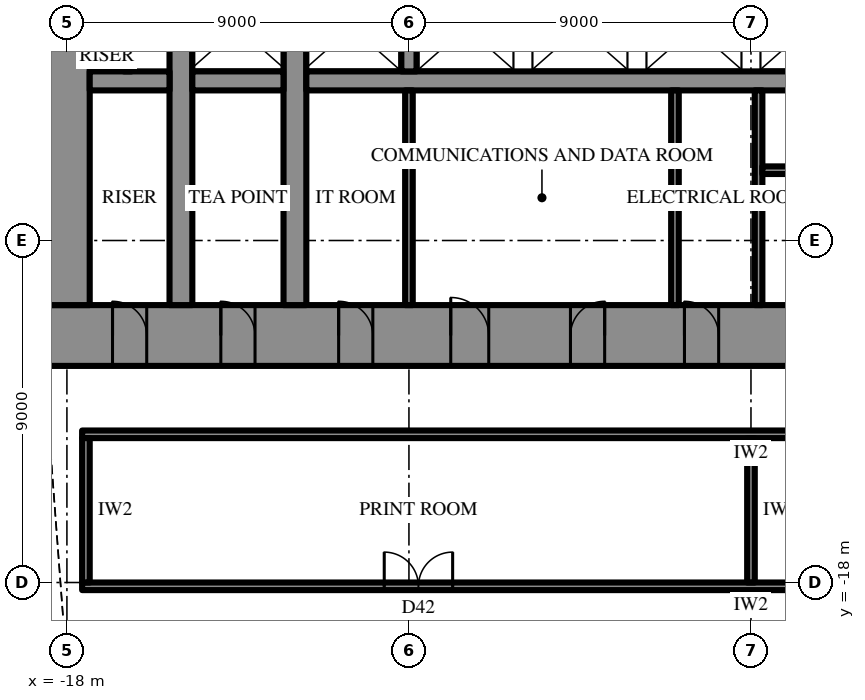
"""IFC4 building model, lengths in metres.
Left out: names, types, materials, properties, quantities, classifications, styles, units other than length and angle.
Written with IfcOpenShell. Run it as: python <this file> out.ifc"""

import sys

from ifc_helpers import new_model, si_unit, direction, frame, frame_2d, origin, place, context, subcontext, project, spatial, rectangle, extrude, element, fill, save


model = new_model("IFC4")
c1 = context("Model", 3, precision=1e-05, world=origin(), true_north=direction((0.0, 1.0)))
c2 = subcontext(c1, "Body", "Model", "MODEL_VIEW")
j1 = project(units=[si_unit("LENGTHUNIT", "METRE"), si_unit("PLANEANGLEUNIT", "RADIAN")], contexts=[c1])
p1 = place(None, origin())
s1 = spatial("IfcSite", under=j1, at=p1, CompositionType="ELEMENT")
p2 = place(p1, origin())
s2 = spatial("IfcBuilding", under=s1, at=p2, CompositionType="ELEMENT")
p3 = place(p2, frame((0.0, 0.0, 195.1)))
s3 = spatial("IfcBuildingStorey", under=s2, at=p3, CompositionType="ELEMENT", Elevation=195.1)
p4 = place(p3, frame((18.6, -11.5, 0.0), z_axis=(0.0, 0.0, 1.0), x_axis=(-1.0, 0.0, 0.0)))
e1 = element("IfcWall", 1, at=p4, inside=s3, PredefinedType="SHEAR", context=c2, shape_type="SweptSolid", body=[
    extrude(rectangle(XDim=37.2, YDim=1.6, at=frame_2d((18.6, 0.0))), origin(), (0.0, 0.0, 1.0), 4.2),
])
p5 = place(p4, frame((19.45, 0.0, 0.0)))
e2 = element("IfcOpeningElement", 2, at=p5, cuts=e1, PredefinedType="OPENING", context=c2, shape_type="SweptSolid", body=[
    extrude(rectangle(XDim=0.9, YDim=2.2, at=frame_2d((0.45, 1.1))), frame((0.0, 0.81, 0.0), z_axis=(0.0, -1.0, 0.0), x_axis=(1.0, 0.0, 0.0)), (0.0, 0.0, 1.0), 1.62),
])
p6 = place(p4, frame((22.45, 0.0, 0.0)))
e3 = element("IfcOpeningElement", 3, at=p6, cuts=e1, PredefinedType="OPENING", context=c2, shape_type="SweptSolid", body=[
    extrude(rectangle(XDim=0.9, YDim=2.2, at=frame_2d((0.45, 1.1))), frame((0.0, 0.81, 0.0), z_axis=(0.0, -1.0, 0.0), x_axis=(1.0, 0.0, 0.0)), (0.0, 0.0, 1.0), 1.62),
])
p7 = place(p4, frame((25.5, 0.0, 0.0)))
e4 = element("IfcOpeningElement", 4, at=p7, cuts=e1, PredefinedType="OPENING", context=c2, shape_type="SweptSolid", body=[
    extrude(rectangle(XDim=1.0, YDim=2.2, at=frame_2d((0.5, 1.1))), frame((0.0, 0.81, 0.0), z_axis=(0.0, -1.0, 0.0), x_axis=(1.0, 0.0, 0.0)), (0.0, 0.0, 1.0), 1.62),
])
p8 = place(p4, frame((1.8, 0.0, 0.0)))
e5 = element("IfcOpeningElement", 5, at=p8, cuts=e1, PredefinedType="OPENING", context=c2, shape_type="SweptSolid", body=[
    extrude(rectangle(XDim=0.9, YDim=2.2, at=frame_2d((0.45, 1.1))), frame((0.0, 0.81, 0.0), z_axis=(0.0, -1.0, 0.0), x_axis=(1.0, 0.0, 0.0)), (0.0, 0.0, 1.0), 1.62),
])
p9 = place(p4, frame((4.65, 0.0, 0.0)))
e6 = element("IfcOpeningElement", 6, at=p9, cuts=e1, PredefinedType="OPENING", context=c2, shape_type="SweptSolid", body=[
    extrude(rectangle(XDim=0.9, YDim=2.2, at=frame_2d((0.45, 1.1))), frame((0.0, 0.81, 0.0), z_axis=(0.0, -1.0, 0.0), x_axis=(1.0, 0.0, 0.0)), (0.0, 0.0, 1.0), 1.62),
])
p10 = place(p4, frame((7.75, 0.0, 0.0)))
e7 = element("IfcOpeningElement", 7, at=p10, cuts=e1, PredefinedType="OPENING", context=c2, shape_type="SweptSolid", body=[
    extrude(rectangle(XDim=0.9, YDim=2.2, at=frame_2d((0.45, 1.1))), frame((0.0, 0.81, 0.0), z_axis=(0.0, -1.0, 0.0), x_axis=(1.0, 0.0, 0.0)), (0.0, 0.0, 1.0), 1.62),
])
p11 = place(p4, frame((28.55, 0.0, 0.0)))
e8 = element("IfcOpeningElement", 8, at=p11, cuts=e1, PredefinedType="OPENING", context=c2, shape_type="SweptSolid", body=[
    extrude(rectangle(XDim=0.9, YDim=2.2, at=frame_2d((0.45, 1.1))), frame((0.0, 0.81, 0.0), z_axis=(0.0, -1.0, 0.0), x_axis=(1.0, 0.0, 0.0)), (0.0, 0.0, 1.0), 1.62),
])
p12 = place(p4, frame((31.65, 0.0, 0.0)))
e9 = element("IfcOpeningElement", 9, at=p12, cuts=e1, PredefinedType="OPENING", context=c2, shape_type="SweptSolid", body=[
    extrude(rectangle(XDim=0.9, YDim=2.2, at=frame_2d((0.45, 1.1))), frame((0.0, 0.81, 0.0), z_axis=(0.0, -1.0, 0.0), x_axis=(1.0, 0.0, 0.0)), (0.0, 0.0, 1.0), 1.62),
])
p13 = place(p4, frame((34.5, 0.0, 0.0)))
e10 = element("IfcOpeningElement", 10, at=p13, cuts=e1, PredefinedType="OPENING", context=c2, shape_type="SweptSolid", body=[
    extrude(rectangle(XDim=0.9, YDim=2.2, at=frame_2d((0.45, 1.1))), frame((0.0, 0.81, 0.0), z_axis=(0.0, -1.0, 0.0), x_axis=(1.0, 0.0, 0.0)), (0.0, 0.0, 1.0), 1.62),
])
p14 = place(p3, frame((-18.0, 10.7, 0.0), z_axis=(0.0, 0.0, 1.0), x_axis=(0.0, -1.0, 0.0)))
e11 = element("IfcWall", 11, at=p14, inside=s3, PredefinedType="SHEAR", context=c2, shape_type="SweptSolid", body=[
    extrude(rectangle(XDim=21.4, YDim=1.2, at=frame_2d((10.7, 0.0))), origin(), (0.0, 0.0, 1.0), 4.2),
])
p15 = place(p14, frame((9.8, 0.0, 0.0)))
e12 = element("IfcOpeningElement", 12, at=p15, cuts=e11, PredefinedType="OPENING", context=c2, shape_type="SweptSolid", body=[
    extrude(rectangle(XDim=1.8, YDim=2.4, at=frame_2d((0.9, 1.2))), frame((0.0, 0.61, 0.0), z_axis=(0.0, -1.0, 0.0), x_axis=(1.0, 0.0, 0.0)), (0.0, 0.0, 1.0), 1.22),
])
p16 = place(p3, frame((-12.0, -10.7, 0.0), z_axis=(0.0, 0.0, 1.0), x_axis=(0.0, 1.0, 0.0)))
e13 = element("IfcWall", 13, at=p16, inside=s3, PredefinedType="SHEAR", context=c2, shape_type="SweptSolid", body=[
    extrude(rectangle(XDim=21.4, YDim=0.6, at=frame_2d((10.7, 0.0))), origin(), (0.0, 0.0, 1.0), 4.2),
])
p17 = place(p16, frame((9.8, 0.0, 0.0)))
e14 = element("IfcOpeningElement", 14, at=p17, cuts=e13, PredefinedType="OPENING", context=c2, shape_type="SweptSolid", body=[
    extrude(rectangle(XDim=1.8, YDim=2.4, at=frame_2d((0.9, 1.2))), frame((0.0, 0.31, 0.0), z_axis=(0.0, -1.0, 0.0), x_axis=(1.0, 0.0, 0.0)), (0.0, 0.0, 1.0), 0.62),
])
p18 = place(p3, frame((-15.0, -10.7, 0.0), z_axis=(0.0, 0.0, 1.0), x_axis=(0.0, 1.0, 0.0)))
e15 = element("IfcWall", 15, at=p18, inside=s3, PredefinedType="SHEAR", context=c2, shape_type="SweptSolid", body=[
    extrude(rectangle(XDim=21.4, YDim=0.6, at=frame_2d((10.7, 0.0))), origin(), (0.0, 0.0, 1.0), 4.2),
])
p19 = place(p18, frame((9.8, 0.0, 0.0)))
e16 = element("IfcOpeningElement", 16, at=p19, cuts=e15, PredefinedType="OPENING", context=c2, shape_type="SweptSolid", body=[
    extrude(rectangle(XDim=1.8, YDim=2.4, at=frame_2d((0.9, 1.2))), frame((0.0, 0.31, 0.0), z_axis=(0.0, -1.0, 0.0), x_axis=(1.0, 0.0, 0.0)), (0.0, 0.0, 1.0), 0.62),
])
p20 = place(p3, frame((11.7, -4.8, 0.0), z_axis=(0.0, 0.0, 1.0), x_axis=(-1.0, 0.0, 0.0)))
e17 = element("IfcWall", 17, at=p20, inside=s3, PredefinedType="SHEAR", context=c2, shape_type="SweptSolid", body=[
    extrude(rectangle(XDim=23.4, YDim=0.5, at=frame_2d((11.7, 0.0))), origin(), (0.0, 0.0, 1.0), 4.2),
])
p21 = place(p20, frame((6.6, 0.0, 0.0)))
e18 = element("IfcOpeningElement", 18, at=p21, cuts=e17, PredefinedType="OPENING", context=c2, shape_type="SweptSolid", body=[
    extrude(rectangle(XDim=1.2, YDim=2.2, at=frame_2d((0.6, 1.1))), frame((0.0, 0.26, 0.0), z_axis=(0.0, -1.0, 0.0), x_axis=(1.0, 0.0, 0.0)), (0.0, 0.0, 1.0), 0.52),
])
p22 = place(p20, frame((3.6, 0.0, 0.0)))
e19 = element("IfcOpeningElement", 19, at=p22, cuts=e17, PredefinedType="OPENING", context=c2, shape_type="SweptSolid", body=[
    extrude(rectangle(XDim=1.2, YDim=2.2, at=frame_2d((0.6, 1.1))), frame((0.0, 0.26, 0.0), z_axis=(0.0, -1.0, 0.0), x_axis=(1.0, 0.0, 0.0)), (0.0, 0.0, 1.0), 0.52),
])
p23 = place(p3, frame((-12.3, -4.8, 0.0), z_axis=(0.0, 0.0, 1.0), x_axis=(-1.0, 0.0, 0.0)))
e20 = element("IfcWall", 20, at=p23, inside=s3, PredefinedType="SHEAR", context=c2, shape_type="SweptSolid", body=[
    extrude(rectangle(XDim=2.4, YDim=0.5, at=frame_2d((1.2, 0.0))), origin(), (0.0, 0.0, 1.0), 4.2),
])
p24 = place(p3, frame((-15.3, -4.8, 0.0), z_axis=(0.0, 0.0, 1.0), x_axis=(-1.0, 0.0, 0.0)))
e21 = element("IfcWall", 21, at=p24, inside=s3, PredefinedType="SHEAR", context=c2, shape_type="SweptSolid", body=[
    extrude(rectangle(XDim=2.1, YDim=0.5, at=frame_2d((1.05, 0.0))), origin(), (0.0, 0.0, 1.0), 4.2),
])
p25 = place(p3, frame((-9.0, -2.25, 0.0), z_axis=(0.0, 0.0, 1.0), x_axis=(0.0, -1.0, 0.0)))
e22 = element("IfcWall", 22, at=p25, inside=s3, PredefinedType="SHEAR", context=c2, shape_type="SweptSolid", body=[
    extrude(rectangle(XDim=2.3, YDim=0.4, at=frame_2d((1.15, 0.0))), origin(), (0.0, 0.0, 1.0), 4.2),
])
p26 = place(p3, frame((0.2, -5.05, 0.0), z_axis=(0.0, 0.0, 1.0), x_axis=(0.0, -1.0, 0.0)))
e23 = element("IfcWall", 23, at=p26, inside=s3, PredefinedType="SHEAR", context=c2, shape_type="SweptSolid", body=[
    extrude(rectangle(XDim=5.65, YDim=0.2, at=frame_2d((2.825, 0.0))), origin(), (0.0, 0.0, 1.0), 4.2),
])
p27 = place(p3, frame((8.9, -7.15, 0.0), z_axis=(0.0, 0.0, 1.0), x_axis=(-1.0, 0.0, 0.0)))
e24 = element("IfcWall", 24, at=p27, inside=s3, PredefinedType="SHEAR", context=c2, shape_type="SweptSolid", body=[
    extrude(rectangle(XDim=8.6, YDim=0.2, at=frame_2d((4.3, 0.0))), origin(), (0.0, 0.0, 1.0), 4.2),
])
p28 = place(p27, frame((0.3, 0.0, 0.0)))
e25 = element("IfcOpeningElement", 25, at=p28, cuts=e24, PredefinedType="OPENING", context=c2, shape_type="SweptSolid", body=[
    extrude(rectangle(XDim=1.0, YDim=2.2, at=frame_2d((0.5, 1.1))), frame((0.0, 0.11, 0.0), z_axis=(0.0, -1.0, 0.0), x_axis=(1.0, 0.0, 0.0)), (0.0, 0.0, 1.0), 0.22),
])
for number, where, z_axis, x_axis in (
    (26, (-9.0, -5.05, 0.0), (0.0, 0.0, 1.0), (0.0, -1.0, 0.0)),
    (27, (-2.0, -5.05, 0.0), (0.0, 0.0, 1.0), (0.0, -1.0, 0.0)),
):
    element("IfcWall", number, at=place(p3, frame(where, z_axis=z_axis, x_axis=x_axis)), inside=s3, PredefinedType="PARTITIONING", context=c2, shape_type="SweptSolid", body=[
        extrude(rectangle(XDim=5.65, YDim=0.2, at=frame_2d((2.825, 0.0))), origin(), (0.0, 0.0, 1.0), 4.0),
    ])
p29 = place(p3, frame((-16.4, -3.55, 0.0), z_axis=(0.0, 0.0, 1.0), x_axis=(0.0, -1.0, 0.0)))
e28 = element("IfcWall", 28, at=p29, inside=s3, PredefinedType="PARTITIONING", context=c2, shape_type="SweptSolid", body=[
    extrude(rectangle(XDim=1.0, YDim=0.2, at=frame_2d((0.5, 0.0))), origin(), (0.0, 0.0, 1.0), 4.0),
])
p30 = place(p3, frame((17.6, -14.1, 0.0), z_axis=(0.0, 0.0, 1.0), x_axis=(-1.0, 0.0, 0.0)))
e29 = element("IfcWall", 29, at=p30, inside=s3, PredefinedType="PARTITIONING", context=c2, shape_type="SweptSolid", body=[
    extrude(rectangle(XDim=35.2, YDim=0.2, at=frame_2d((17.6, 0.0))), origin(), (0.0, 0.0, 1.0), 4.0),
])
p31 = place(p3, frame((17.6, -18.1, 0.0), z_axis=(0.0, 0.0, 1.0), x_axis=(-1.0, 0.0, 0.0)))
e30 = element("IfcWall", 30, at=p31, inside=s3, PredefinedType="PARTITIONING", context=c2, shape_type="SweptSolid", body=[
    extrude(rectangle(XDim=35.2, YDim=0.2, at=frame_2d((17.6, 0.0))), origin(), (0.0, 0.0, 1.0), 4.0),
])
p32 = place(p31, frame((7.95, 0.0, 0.0)))
e31 = element("IfcOpeningElement", 31, at=p32, cuts=e30, PredefinedType="OPENING", context=c2, shape_type="SweptSolid", body=[
    extrude(rectangle(XDim=1.8, YDim=2.4, at=frame_2d((0.9, 1.2))), frame((0.0, 0.11, 0.0), z_axis=(0.0, -1.0, 0.0), x_axis=(1.0, 0.0, 0.0)), (0.0, 0.0, 1.0), 0.22),
])
p33 = place(p31, frame((25.45, 0.0, 0.0)))
e32 = element("IfcOpeningElement", 32, at=p33, cuts=e30, PredefinedType="OPENING", context=c2, shape_type="SweptSolid", body=[
    extrude(rectangle(XDim=1.8, YDim=2.4, at=frame_2d((0.9, 1.2))), frame((0.0, 0.11, 0.0), z_axis=(0.0, -1.0, 0.0), x_axis=(1.0, 0.0, 0.0)), (0.0, 0.0, 1.0), 0.22),
])
p34 = place(p3, frame((0.0, -14.2, 0.0), z_axis=(0.0, 0.0, 1.0), x_axis=(0.0, -1.0, 0.0)))
e33 = element("IfcWall", 33, at=p34, inside=s3, PredefinedType="PARTITIONING", context=c2, shape_type="SweptSolid", body=[
    extrude(rectangle(XDim=3.8, YDim=0.2, at=frame_2d((1.9, 0.0))), origin(), (0.0, 0.0, 1.0), 2.992),
])
p35 = place(p3, frame((-17.5, -14.2, 0.0), z_axis=(0.0, 0.0, 1.0), x_axis=(0.0, -1.0, 0.0)))
e34 = element("IfcWall", 34, at=p35, inside=s3, PredefinedType="PARTITIONING", context=c2, shape_type="SweptSolid", body=[
    extrude(rectangle(XDim=3.8, YDim=0.2, at=frame_2d((1.9, 0.0))), origin(), (0.0, 0.0, 1.0), 4.0),
])
p36 = place(p5, frame((0.9, 0.0, 0.0), z_axis=(0.0, 0.0, 1.0), x_axis=(-1.0, 0.0, 0.0)))
e35 = element("IfcDoor", 35, at=p36, inside=s3, OperationType="SINGLE_SWING_RIGHT", PredefinedType="DOOR", context=c2, shape_type="SweptSolid", body=[
    extrude(rectangle(XDim=0.9, YDim=2.2, at=frame_2d((0.45, 1.1))), frame((0.0, 0.025, 0.0), z_axis=(0.0, -1.0, 0.0), x_axis=(1.0, 0.0, 0.0)), (0.0, 0.0, 1.0), 0.05),
])
fill(e2, e35)
p37 = place(p6, frame((0.9, 0.0, 0.0), z_axis=(0.0, 0.0, 1.0), x_axis=(-1.0, 0.0, 0.0)))
e36 = element("IfcDoor", 36, at=p37, inside=s3, OperationType="SINGLE_SWING_LEFT", PredefinedType="DOOR", context=c2, shape_type="SweptSolid", body=[
    extrude(rectangle(XDim=0.9, YDim=2.2, at=frame_2d((0.45, 1.1))), frame((0.0, 0.025, 0.0), z_axis=(0.0, -1.0, 0.0), x_axis=(1.0, 0.0, 0.0)), (0.0, 0.0, 1.0), 0.05),
])
fill(e3, e36)
p38 = place(p7, frame((1.0, 0.0, 0.0), z_axis=(0.0, 0.0, 1.0), x_axis=(-1.0, 0.0, 0.0)))
e37 = element("IfcDoor", 37, at=p38, inside=s3, OperationType="SINGLE_SWING_RIGHT", PredefinedType="DOOR", context=c2, shape_type="SweptSolid", body=[
    extrude(rectangle(XDim=1.0, YDim=2.2, at=frame_2d((0.5, 1.1))), frame((0.0, 0.025, 0.0), z_axis=(0.0, -1.0, 0.0), x_axis=(1.0, 0.0, 0.0)), (0.0, 0.0, 1.0), 0.05),
])
fill(e4, e37)
p39 = place(p11, frame((0.9, 0.0, 0.0), z_axis=(0.0, 0.0, 1.0), x_axis=(-1.0, 0.0, 0.0)))
e38 = element("IfcDoor", 38, at=p39, inside=s3, OperationType="SINGLE_SWING_RIGHT", PredefinedType="DOOR", context=c2, shape_type="SweptSolid", body=[
    extrude(rectangle(XDim=0.9, YDim=2.2, at=frame_2d((0.45, 1.1))), frame((0.0, 0.025, 0.0), z_axis=(0.0, -1.0, 0.0), x_axis=(1.0, 0.0, 0.0)), (0.0, 0.0, 1.0), 0.05),
])
fill(e8, e38)
p40 = place(p12, frame((0.9, 0.0, 0.0), z_axis=(0.0, 0.0, 1.0), x_axis=(-1.0, 0.0, 0.0)))
e39 = element("IfcDoor", 39, at=p40, inside=s3, OperationType="SINGLE_SWING_RIGHT", PredefinedType="DOOR", context=c2, shape_type="SweptSolid", body=[
    extrude(rectangle(XDim=0.9, YDim=2.2, at=frame_2d((0.45, 1.1))), frame((0.0, 0.025, 0.0), z_axis=(0.0, -1.0, 0.0), x_axis=(1.0, 0.0, 0.0)), (0.0, 0.0, 1.0), 0.05),
])
fill(e9, e39)
p41 = place(p13, frame((0.9, 0.0, 0.0), z_axis=(0.0, 0.0, 1.0), x_axis=(-1.0, 0.0, 0.0)))
e40 = element("IfcDoor", 40, at=p41, inside=s3, OperationType="SINGLE_SWING_RIGHT", PredefinedType="DOOR", context=c2, shape_type="SweptSolid", body=[
    extrude(rectangle(XDim=0.9, YDim=2.2, at=frame_2d((0.45, 1.1))), frame((0.0, 0.025, 0.0), z_axis=(0.0, -1.0, 0.0), x_axis=(1.0, 0.0, 0.0)), (0.0, 0.0, 1.0), 0.05),
])
fill(e10, e40)
p42 = place(p33, frame((1.8, 0.0, 0.0), z_axis=(0.0, 0.0, 1.0), x_axis=(-1.0, 0.0, 0.0)))
e41 = element("IfcDoor", 41, at=p42, inside=s3, OperationType="DOUBLE_DOOR_SINGLE_SWING", PredefinedType="DOOR", context=c2, shape_type="SweptSolid", body=[
    extrude(rectangle(XDim=1.8, YDim=2.4, at=frame_2d((0.9, 1.2))), frame((0.0, 0.025, 0.0), z_axis=(0.0, -1.0, 0.0), x_axis=(1.0, 0.0, 0.0)), (0.0, 0.0, 1.0), 0.05),
])
fill(e32, e41)
save(model, sys.argv[1])
